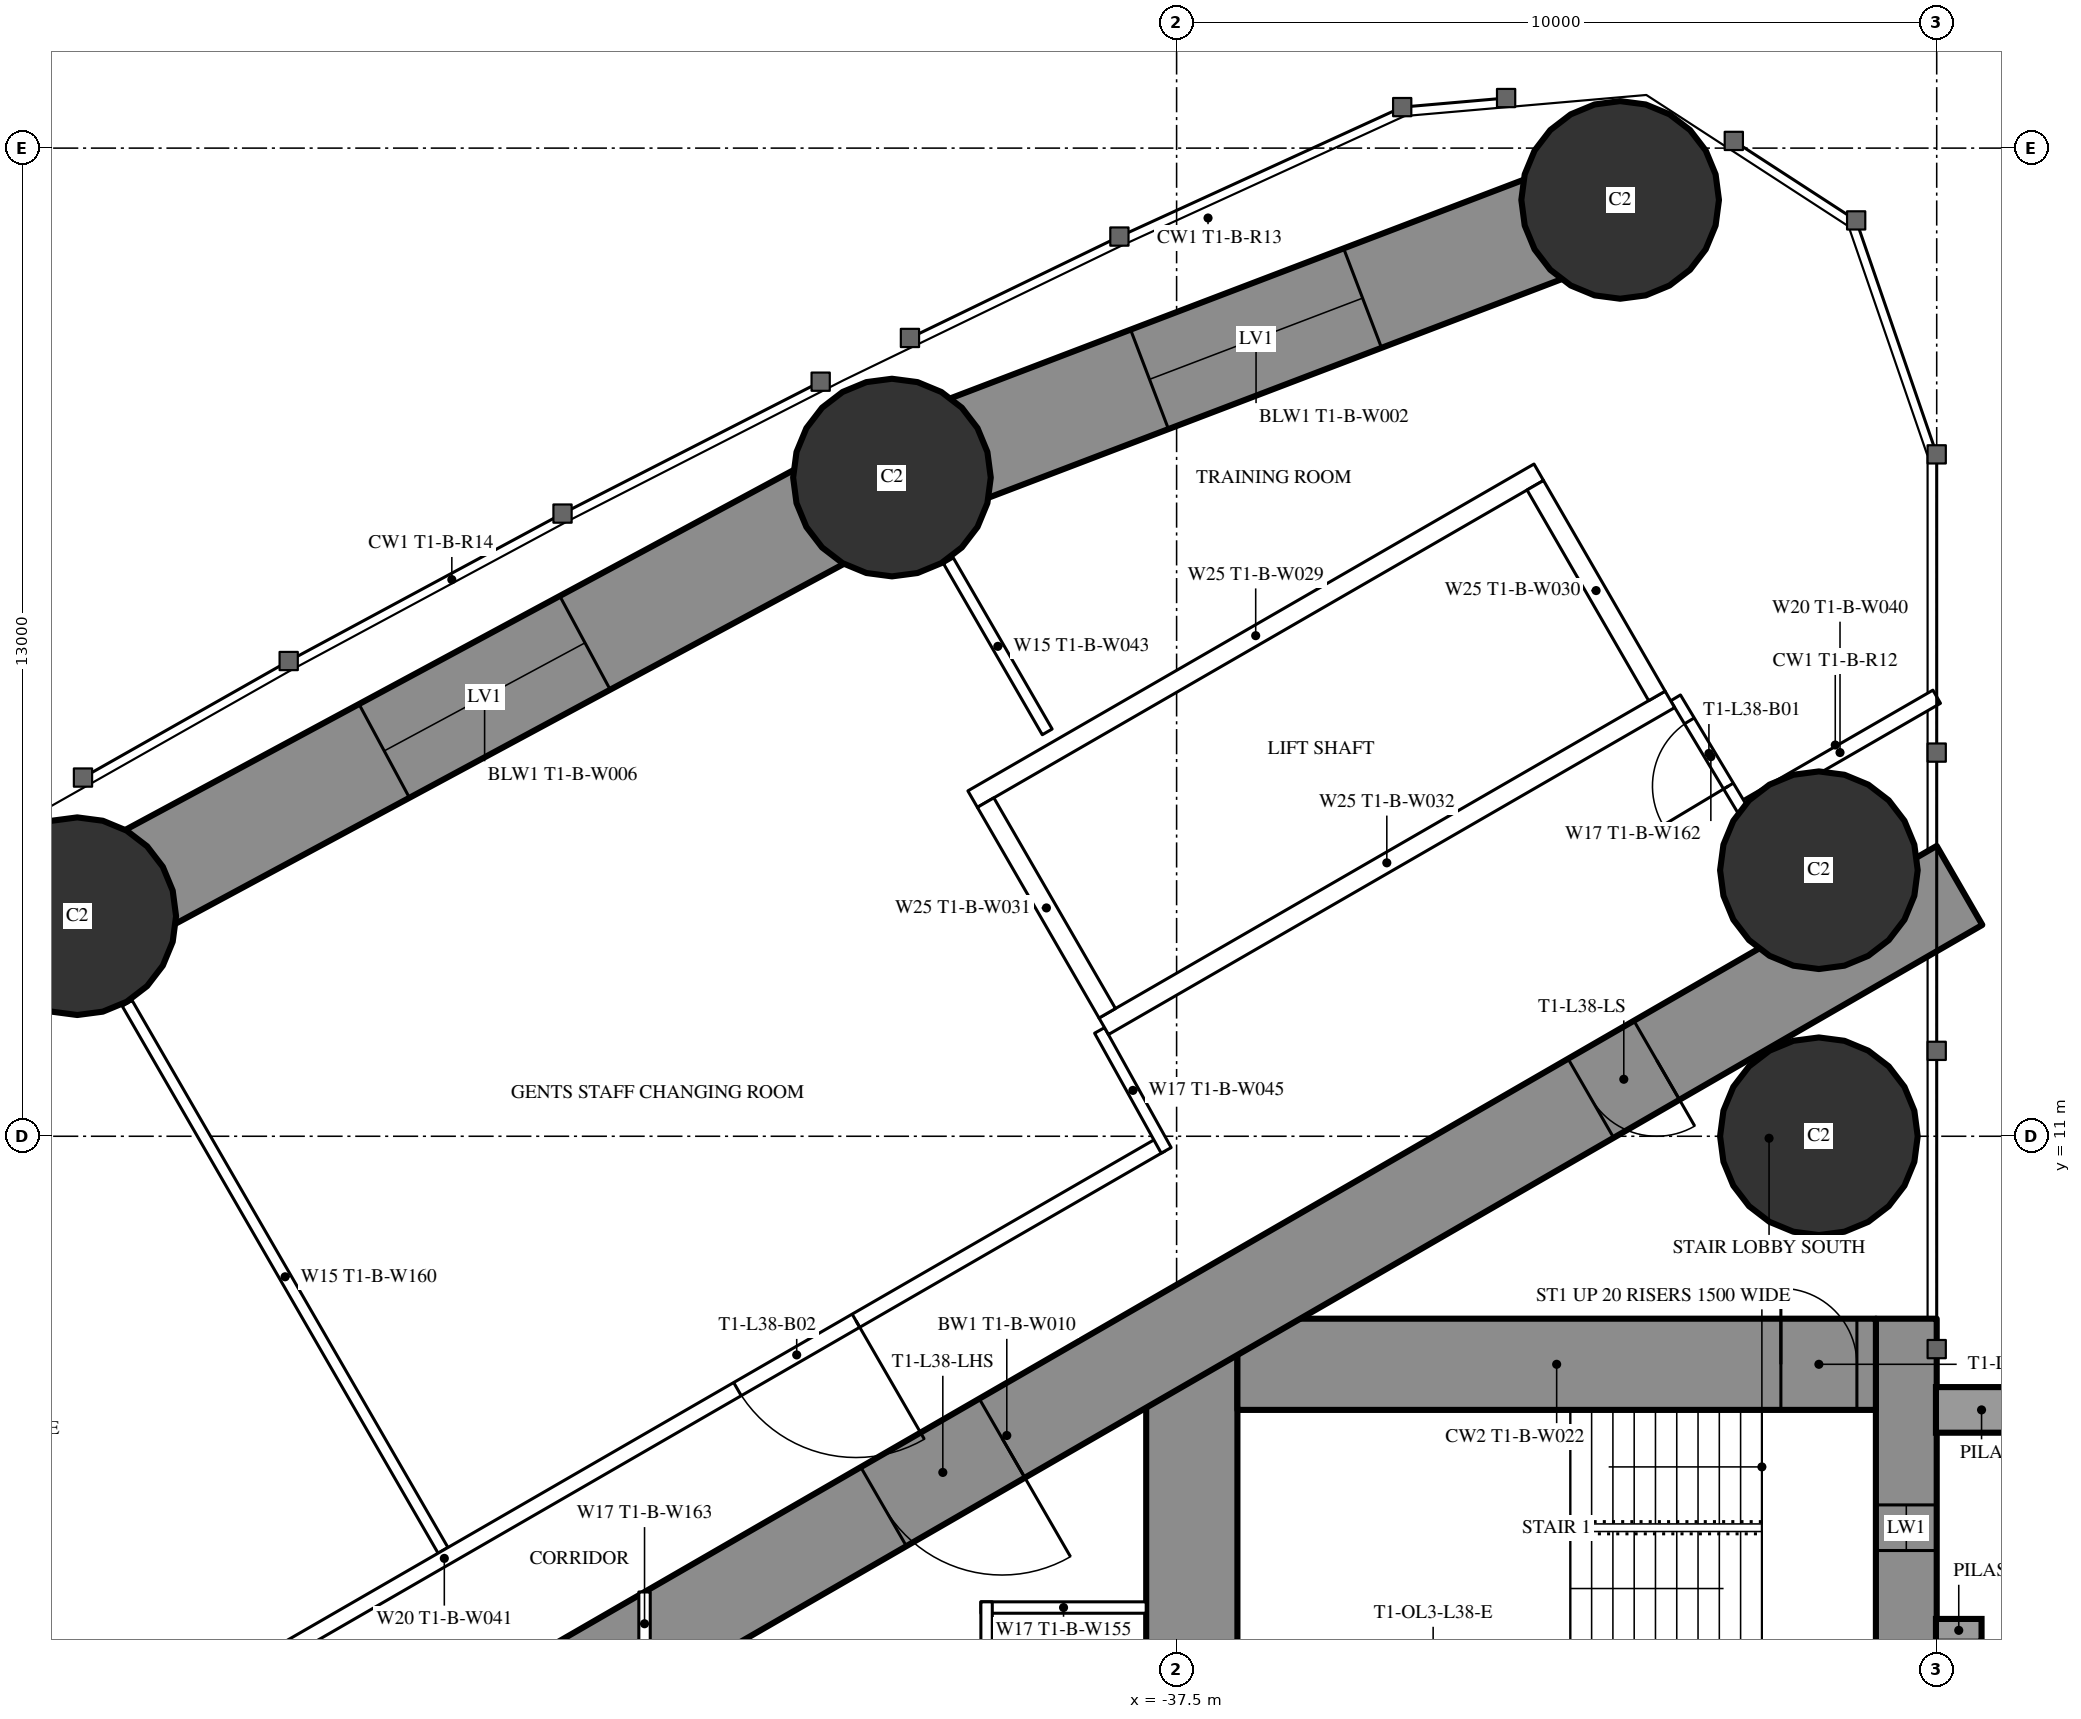
"""IFC4 building model, lengths in metres.
Left out: names, types, materials, properties, quantities, classifications, styles, units other than length and angle.
Written with IfcOpenShell. Run it as: python <this file> out.ifc"""

import sys

from ifc_helpers import new_model, si_unit, direction, frame, frame_2d, origin, origin_2d, place, context, subcontext, project, spatial, rectangle, hollow_circle, extrude, element, fill, save


model = new_model("IFC4")
c1 = context("Model", 3, precision=1e-05, world=origin(), true_north=direction((0.0, 1.0)))
c2 = subcontext(c1, "Body", "Model", "MODEL_VIEW")
j1 = project(units=[si_unit("LENGTHUNIT", "METRE"), si_unit("PLANEANGLEUNIT", "RADIAN")], contexts=[c1])
p1 = place(None, origin())
s1 = spatial("IfcSite", under=j1, at=p1, CompositionType="ELEMENT")
p2 = place(p1, origin())
s2 = spatial("IfcBuilding", under=s1, at=p2, CompositionType="ELEMENT")
p3 = place(p2, frame((0.0, 0.0, 143.1)))
s3 = spatial("IfcBuildingStorey", under=s2, at=p3, CompositionType="ELEMENT", Elevation=143.1)
for number, where, z_axis, x_axis in (
    (1, (-31.665, 23.318, 0.0), (0.0, 0.0, 1.0), (1.0, 0.0, 0.0)),
    (2, (-29.05, 11.0, 0.0), (0.0, 0.0, 1.0), (1.0, 0.0, 0.0)),
    (3, (-29.05, 14.5, 0.0), (0.0, 0.0, 1.0), (1.0, 0.0, 0.0)),
    (4, (-41.245, 19.666, 0.0), (0.0, 0.0, 1.0), (1.0, 0.0, 0.0)),
    (5, (-51.963, 13.895, 0.0), (0.0, 0.0, 1.0), (1.0, 0.0, 0.0)),
):
    element("IfcColumn", number, at=place(p3, frame(where, z_axis=z_axis, x_axis=x_axis)), inside=s3, PredefinedType="COLUMN", context=c2, shape_type="SweptSolid", body=[
        extrude(hollow_circle(Radius=1.3, WallThickness=0.1, at=origin_2d()), origin(), (0.0, 0.0, 1.0), 3.6),
    ])
p4 = place(p3, frame((-27.9, 8.6, 0.0), z_axis=(0.0, 0.0, 1.0), x_axis=(0.0, -1.0, 0.0)))
e6 = element("IfcWall", 6, at=p4, inside=s3, PredefinedType="SHEAR", context=c2, shape_type="SweptSolid", body=[
    extrude(rectangle(XDim=17.2, YDim=0.8, at=frame_2d((8.6, 0.0))), origin(), (0.0, 0.0, 1.0), 3.6),
])
p5 = place(p4, frame((2.45, 0.0, 0.6)))
e7 = element("IfcOpeningElement", 7, at=p5, cuts=e6, PredefinedType="OPENING", context=c2, shape_type="SweptSolid", body=[
    extrude(rectangle(XDim=0.6, YDim=2.1, at=frame_2d((0.3, 1.05))), frame((0.0, 0.41, 0.0), z_axis=(0.0, -1.0, 0.0), x_axis=(1.0, 0.0, 0.0)), (0.0, 0.0, 1.0), 0.82),
])
p6 = place(p4, frame((14.15, 0.0, 0.6)))
e8 = element("IfcOpeningElement", 8, at=p6, cuts=e6, PredefinedType="OPENING", context=c2, shape_type="SweptSolid", body=[
    extrude(rectangle(XDim=0.6, YDim=2.1, at=frame_2d((0.3, 1.05))), frame((0.0, 0.41, 0.0), z_axis=(0.0, -1.0, 0.0), x_axis=(1.0, 0.0, 0.0)), (0.0, 0.0, 1.0), 0.82),
])
p7 = place(p3, frame((-37.3, 8.6, 0.0), z_axis=(0.0, 0.0, 1.0), x_axis=(0.0, -1.0, 0.0)))
e9 = element("IfcWall", 9, at=p7, inside=s3, PredefinedType="SHEAR", context=c2, shape_type="SweptSolid", body=[
    extrude(rectangle(XDim=17.2, YDim=1.2, at=frame_2d((8.6, 0.0))), origin(), (0.0, 0.0, 1.0), 3.6),
])
p8 = place(p7, frame((7.7, 0.0, 0.0)))
e10 = element("IfcOpeningElement", 10, at=p8, cuts=e9, PredefinedType="OPENING", context=c2, shape_type="SweptSolid", body=[
    extrude(rectangle(XDim=1.8, YDim=2.2, at=frame_2d((0.9, 1.1))), frame((0.0, 0.61, 0.0), z_axis=(0.0, -1.0, 0.0), x_axis=(1.0, 0.0, 0.0)), (0.0, 0.0, 1.0), 1.22),
])
p9 = place(p3, frame((-28.3, 8.0, 0.0), z_axis=(0.0, 0.0, 1.0), x_axis=(-1.0, 0.0, 0.0)))
e11 = element("IfcWall", 11, at=p9, inside=s3, PredefinedType="SHEAR", context=c2, shape_type="SweptSolid", body=[
    extrude(rectangle(XDim=8.4, YDim=1.2, at=frame_2d((4.2, 0.0))), origin(), (0.0, 0.0, 1.0), 3.6),
])
p10 = place(p9, frame((0.25, 0.0, 0.0)))
e12 = element("IfcOpeningElement", 12, at=p10, cuts=e11, PredefinedType="OPENING", context=c2, shape_type="SweptSolid", body=[
    extrude(rectangle(XDim=1.0, YDim=2.2, at=frame_2d((0.5, 1.1))), frame((0.0, 0.61, 0.0), z_axis=(0.0, -1.0, 0.0), x_axis=(1.0, 0.0, 0.0)), (0.0, 0.0, 1.0), 1.22),
])
p11 = place(p3, frame((-27.2, 14.3, 0.0), z_axis=(0.0, 0.0, 1.0), x_axis=(-0.866026593062, -0.499997940104, 0.0)))
e13 = element("IfcWall", 13, at=p11, inside=s3, PredefinedType="SHEAR", context=c2, shape_type="SweptSolid", body=[
    extrude(rectangle(XDim=28.946, YDim=1.2, at=frame_2d((14.473, 0.0))), origin(), (0.0, 0.0, 1.0), 3.6),
])
p12 = place(p11, frame((4.6, 0.0, 0.0)))
e14 = element("IfcOpeningElement", 14, at=p12, cuts=e13, PredefinedType="OPENING", context=c2, shape_type="SweptSolid", body=[
    extrude(rectangle(XDim=1.0, YDim=2.2, at=frame_2d((0.5, 1.1))), frame((0.0, 0.61, 0.0), z_axis=(0.0, -1.0, 0.0), x_axis=(1.0, 0.0, 0.0)), (0.0, 0.0, 1.0), 1.22),
])
p13 = place(p11, frame((14.545, 0.0, 0.0)))
e15 = element("IfcOpeningElement", 15, at=p13, cuts=e13, PredefinedType="OPENING", context=c2, shape_type="SweptSolid", body=[
    extrude(rectangle(XDim=1.8, YDim=2.2, at=frame_2d((0.9, 1.1))), frame((0.0, 0.61, 0.0), z_axis=(0.0, -1.0, 0.0), x_axis=(1.0, 0.0, 0.0)), (0.0, 0.0, 1.0), 1.22),
])
p14 = place(p3, frame((-31.665, 23.318, 0.0), z_axis=(0.0, 0.0, 1.0), x_axis=(-0.934392266213, -0.356245832033, 0.0)))
e16 = element("IfcWall", 16, at=p14, inside=s3, PredefinedType="SHEAR", context=c2, shape_type="SweptSolid", body=[
    extrude(rectangle(XDim=10.253, YDim=1.4, at=frame_2d((5.126, 0.0))), origin(), (0.0, 0.0, 1.0), 3.6),
])
p15 = place(p14, frame((3.626, 0.0, 0.6)))
e17 = element("IfcOpeningElement", 17, at=p15, cuts=e16, PredefinedType="OPENING", context=c2, shape_type="SweptSolid", body=[
    extrude(rectangle(XDim=3.0, YDim=1.2, at=frame_2d((1.5, 0.6))), frame((0.0, 0.71, 0.0), z_axis=(0.0, -1.0, 0.0), x_axis=(1.0, 0.0, 0.0)), (0.0, 0.0, 1.0), 1.42),
])
p16 = place(p3, frame((-41.245, 19.666, 0.0), z_axis=(0.0, 0.0, 1.0), x_axis=(-0.880492350889, -0.474060354835, 0.0)))
e18 = element("IfcWall", 18, at=p16, inside=s3, PredefinedType="SHEAR", context=c2, shape_type="SweptSolid", body=[
    extrude(rectangle(XDim=12.173, YDim=1.4, at=frame_2d((6.086, 0.0))), origin(), (0.0, 0.0, 1.0), 3.6),
])
p17 = place(p16, frame((4.586, 0.0, 0.6)))
e19 = element("IfcOpeningElement", 19, at=p17, cuts=e18, PredefinedType="OPENING", context=c2, shape_type="SweptSolid", body=[
    extrude(rectangle(XDim=3.0, YDim=1.2, at=frame_2d((1.5, 0.6))), frame((0.0, 0.71, 0.0), z_axis=(0.0, -1.0, 0.0), x_axis=(1.0, 0.0, 0.0)), (0.0, 0.0, 1.0), 1.42),
])
p18 = place(p3, frame((-51.963, 13.895, 0.0), z_axis=(0.0, 0.0, 1.0), x_axis=(-0.848062521637, -0.529896177939, 0.0)))
e20 = element("IfcWall", 20, at=p18, inside=s3, PredefinedType="SHEAR", context=c2, shape_type="SweptSolid", body=[
    extrude(rectangle(XDim=12.173, YDim=1.4, at=frame_2d((6.086, 0.0))), origin(), (0.0, 0.0, 1.0), 3.6),
])
p19 = place(p18, frame((4.586, 0.0, 0.6)))
e21 = element("IfcOpeningElement", 21, at=p19, cuts=e20, PredefinedType="OPENING", context=c2, shape_type="SweptSolid", body=[
    extrude(rectangle(XDim=3.0, YDim=1.2, at=frame_2d((1.5, 0.6))), frame((0.0, 0.71, 0.0), z_axis=(0.0, -1.0, 0.0), x_axis=(1.0, 0.0, 0.0)), (0.0, 0.0, 1.0), 1.42),
])
p20 = place(p3, frame((-47.151, 5.552, 0.0), z_axis=(0.0, 0.0, 1.0), x_axis=(-0.500003012045, 0.866023664773, 0.0)))
e22 = element("IfcWall", 22, at=p20, inside=s3, PredefinedType="PARTITIONING", context=c2, shape_type="SweptSolid", body=[
    extrude(rectangle(XDim=8.311, YDim=0.15, at=frame_2d((4.156, 0.0))), origin(), (0.0, 0.0, 1.0), 2.15),
])
p21 = place(p3, frame((-39.202, 16.32, 0.0), z_axis=(0.0, 0.0, 1.0), x_axis=(-0.499947391036, 0.866055775454, 0.0)))
e23 = element("IfcWall", 23, at=p21, inside=s3, PredefinedType="PARTITIONING", context=c2, shape_type="SweptSolid", body=[
    extrude(rectangle(XDim=2.599, YDim=0.15, at=frame_2d((1.3, 0.0))), origin(), (0.0, 0.0, 1.0), 3.35),
])
p22 = place(p3, frame((-27.5, 16.782, 0.0), z_axis=(0.0, 0.0, 1.0), x_axis=(-0.866045812642, -0.499964649156, 0.0)))
e24 = element("IfcWall", 24, at=p22, inside=s3, PredefinedType="PARTITIONING", context=c2, shape_type="SweptSolid", body=[
    extrude(rectangle(XDim=2.938, YDim=0.2, at=frame_2d((1.469, 0.0))), origin(), (0.0, 0.0, 1.0), 3.35),
])
p23 = place(p3, frame((-37.7, 10.894, 0.0), z_axis=(0.0, 0.0, 1.0), x_axis=(-0.866027905338, -0.499995667157, 0.0)))
e25 = element("IfcWall", 25, at=p23, inside=s3, PredefinedType="PARTITIONING", context=c2, shape_type="SweptSolid", body=[
    extrude(rectangle(XDim=21.787, YDim=0.2, at=frame_2d((10.894, 0.0))), origin(), (0.0, 0.0, 1.0), 3.35),
])
p24 = place(p23, frame((14.296, 0.0, 0.0)))
e26 = element("IfcOpeningElement", 26, at=p24, cuts=e25, PredefinedType="OPENING", context=c2, shape_type="SweptSolid", body=[
    extrude(rectangle(XDim=1.8, YDim=2.2, at=frame_2d((0.9, 1.1))), frame((0.0, 0.11, 0.0), z_axis=(0.0, -1.0, 0.0), x_axis=(1.0, 0.0, 0.0)), (0.0, 0.0, 1.0), 0.22),
])
p25 = place(p23, frame((19.399, 0.0, 0.0)))
e27 = element("IfcOpeningElement", 27, at=p25, cuts=e25, PredefinedType="OPENING", context=c2, shape_type="SweptSolid", body=[
    extrude(rectangle(XDim=1.8, YDim=2.14, at=frame_2d((0.9, 1.07))), frame((0.0, 0.11, 0.0), z_axis=(0.0, -1.0, 0.0), x_axis=(1.0, 0.0, 0.0)), (0.0, 0.0, 1.0), 0.22),
])
p26 = place(p23, frame((4.64, 0.0, 0.0)))
e28 = element("IfcOpeningElement", 28, at=p26, cuts=e25, PredefinedType="OPENING", context=c2, shape_type="SweptSolid", body=[
    extrude(rectangle(XDim=1.8, YDim=2.2, at=frame_2d((0.9, 1.1))), frame((0.0, 0.11, 0.0), z_axis=(0.0, -1.0, 0.0), x_axis=(1.0, 0.0, 0.0)), (0.0, 0.0, 1.0), 0.22),
])
p27 = place(p3, frame((-30.007, 15.219, 0.0), z_axis=(0.0, 0.0, 1.0), x_axis=(-0.514296815006, 0.857612258585, 0.0)))
e29 = element("IfcWall", 29, at=p27, inside=s3, PredefinedType="PARTITIONING", context=c2, shape_type="SweptSolid", body=[
    extrude(rectangle(XDim=1.805, YDim=0.15, at=frame_2d((0.902, 0.0))), origin(), (0.0, 0.0, 1.0), 2.05),
])
p28 = place(p27, frame((0.452, 0.0, 0.0)))
e30 = element("IfcOpeningElement", 30, at=p28, cuts=e29, PredefinedType="OPENING", context=c2, shape_type="SweptSolid", body=[
    extrude(rectangle(XDim=1.0, YDim=2.04, at=frame_2d((0.5, 1.02))), frame((0.0, 0.085, 0.0), z_axis=(0.0, -1.0, 0.0), x_axis=(1.0, 0.0, 0.0)), (0.0, 0.0, 1.0), 0.17),
])
p29 = place(p3, frame((-38.513, 12.392, 0.0), z_axis=(0.0, 0.0, 1.0), x_axis=(0.485585508183, -0.874189175317, 0.0)))
e31 = element("IfcWall", 31, at=p29, inside=s3, PredefinedType="PARTITIONING", context=c2, shape_type="SweptSolid", body=[
    extrude(rectangle(XDim=1.805, YDim=0.15, at=frame_2d((0.902, 0.0))), origin(), (0.0, 0.0, 1.0), 3.35),
])
p30 = place(p3, frame((-37.9, 4.8, 0.0), z_axis=(0.0, 0.0, 1.0), x_axis=(-1.0, 0.0, 0.0)))
e32 = element("IfcWall", 32, at=p30, inside=s3, PredefinedType="PARTITIONING", context=c2, shape_type="SweptSolid", body=[
    extrude(rectangle(XDim=2.175, YDim=0.15, at=frame_2d((1.087, 0.0))), origin(), (0.0, 0.0, 1.0), 3.35),
])
p31 = place(p3, frame((-40.0, 4.875, 0.0), z_axis=(0.0, 0.0, 1.0), x_axis=(0.0, -1.0, 0.0)))
e33 = element("IfcWall", 33, at=p31, inside=s3, PredefinedType="PARTITIONING", context=c2, shape_type="SweptSolid", body=[
    extrude(rectangle(XDim=3.75, YDim=0.15, at=frame_2d((1.875, 0.0))), origin(), (0.0, 0.0, 1.0), 3.35),
])
p32 = place(p31, frame((1.375, 0.0, 0.0)))
e34 = element("IfcOpeningElement", 34, at=p32, cuts=e33, PredefinedType="OPENING", context=c2, shape_type="SweptSolid", body=[
    extrude(rectangle(XDim=1.0, YDim=2.2, at=frame_2d((0.5, 1.1))), frame((0.0, 0.085, 0.0), z_axis=(0.0, -1.0, 0.0), x_axis=(1.0, 0.0, 0.0)), (0.0, 0.0, 1.0), 0.17),
])
for number, where, z_axis, x_axis in (
    (35, (-31.01, 16.747, 0.0), (0.0, 0.0, 1.0), (-0.866, -0.5, 0.0)),
    (36, (-32.736, 19.736, 0.0), (0.0, 0.0, 1.0), (-0.866, -0.5, 0.0)),
):
    element("IfcWall", number, at=place(p3, frame(where, z_axis=z_axis, x_axis=x_axis)), inside=s3, PredefinedType="PARTITIONING", context=c2, shape_type="SweptSolid", body=[
        extrude(rectangle(XDim=8.6, YDim=0.25, at=frame_2d((4.3, 0.0))), origin(), (0.0, 0.0, 1.0), 3.35),
    ])
p33 = place(p3, frame((-31.181, 16.793, 0.0), z_axis=(0.0, 0.0, 1.0), x_axis=(-0.499929347863, 0.866066190972, 0.0)))
e37 = element("IfcWall", 37, at=p33, inside=s3, PredefinedType="PARTITIONING", context=c2, shape_type="SweptSolid", body=[
    extrude(rectangle(XDim=3.201, YDim=0.25, at=frame_2d((1.6, 0.0))), origin(), (0.0, 0.0, 1.0), 3.35),
])
p34 = place(p3, frame((-38.413, 12.618, 0.0), z_axis=(0.0, 0.0, 1.0), x_axis=(-0.499872130319, 0.866099216793, 0.0)))
e38 = element("IfcWall", 38, at=p34, inside=s3, PredefinedType="PARTITIONING", context=c2, shape_type="SweptSolid", body=[
    extrude(rectangle(XDim=3.2, YDim=0.25, at=frame_2d((1.6, 0.0))), origin(), (0.0, 0.0, 1.0), 3.35),
])
p35 = place(p3, frame((-44.5, 5.005, 0.0), z_axis=(0.0, 0.0, 1.0), x_axis=(0.0, -1.0, 0.0)))
e39 = element("IfcWall", 39, at=p35, inside=s3, PredefinedType="PARTITIONING", context=c2, shape_type="SweptSolid", body=[
    extrude(rectangle(XDim=0.836, YDim=0.15, at=frame_2d((0.418, 0.0))), origin(), (0.0, 0.0, 1.0), 2.15),
])
p36 = place(p15, origin())
e40 = element("IfcWindow", 40, at=p36, inside=s3, PartitioningType="SINGLE_PANEL", PredefinedType="WINDOW", context=c2, shape_type="SweptSolid", body=[
    extrude(rectangle(XDim=3.0, YDim=1.2, at=frame_2d((1.5, 0.6))), frame((0.0, 0.03, 0.0), z_axis=(0.0, -1.0, 0.0), x_axis=(1.0, 0.0, 0.0)), (0.0, 0.0, 1.0), 0.06),
])
fill(e17, e40)
p37 = place(p17, origin())
e41 = element("IfcWindow", 41, at=p37, inside=s3, PartitioningType="SINGLE_PANEL", PredefinedType="WINDOW", context=c2, shape_type="SweptSolid", body=[
    extrude(rectangle(XDim=3.0, YDim=1.2, at=frame_2d((1.5, 0.6))), frame((0.0, 0.03, 0.0), z_axis=(0.0, -1.0, 0.0), x_axis=(1.0, 0.0, 0.0)), (0.0, 0.0, 1.0), 0.06),
])
fill(e19, e41)
p38 = place(p28, origin())
e42 = element("IfcDoor", 42, at=p38, inside=s3, OperationType="SINGLE_SWING_LEFT", PredefinedType="DOOR", context=c2, shape_type="SweptSolid", body=[
    extrude(rectangle(XDim=1.0, YDim=2.04, at=frame_2d((0.5, 1.02))), frame((0.0, 0.025, 0.0), z_axis=(0.0, -1.0, 0.0), x_axis=(1.0, 0.0, 0.0)), (0.0, 0.0, 1.0), 0.05),
])
fill(e30, e42)
p39 = place(p26, origin())
e43 = element("IfcDoor", 43, at=p39, inside=s3, OperationType="DOUBLE_DOOR_SINGLE_SWING", PredefinedType="DOOR", context=c2, shape_type="SweptSolid", body=[
    extrude(rectangle(XDim=1.8, YDim=2.2, at=frame_2d((0.9, 1.1))), frame((0.0, 0.025, 0.0), z_axis=(0.0, -1.0, 0.0), x_axis=(1.0, 0.0, 0.0)), (0.0, 0.0, 1.0), 0.05),
])
fill(e28, e43)
p40 = place(p12, origin())
e44 = element("IfcDoor", 44, at=p40, inside=s3, OperationType="SINGLE_SWING_LEFT", PredefinedType="DOOR", context=c2, shape_type="SweptSolid", body=[
    extrude(rectangle(XDim=1.0, YDim=2.2, at=frame_2d((0.5, 1.1))), frame((0.0, 0.025, 0.0), z_axis=(0.0, -1.0, 0.0), x_axis=(1.0, 0.0, 0.0)), (0.0, 0.0, 1.0), 0.05),
])
fill(e14, e44)
p41 = place(p13, origin())
e45 = element("IfcDoor", 45, at=p41, inside=s3, OperationType="DOUBLE_DOOR_SINGLE_SWING", PredefinedType="DOOR", context=c2, shape_type="SweptSolid", body=[
    extrude(rectangle(XDim=1.8, YDim=2.2, at=frame_2d((0.9, 1.1))), frame((0.0, 0.025, 0.0), z_axis=(0.0, -1.0, 0.0), x_axis=(1.0, 0.0, 0.0)), (0.0, 0.0, 1.0), 0.05),
])
fill(e15, e45)
p42 = place(p10, origin())
e46 = element("IfcDoor", 46, at=p42, inside=s3, OperationType="SINGLE_SWING_RIGHT", PredefinedType="DOOR", context=c2, shape_type="SweptSolid", body=[
    extrude(rectangle(XDim=1.0, YDim=2.2, at=frame_2d((0.5, 1.1))), frame((0.0, 0.025, 0.0), z_axis=(0.0, -1.0, 0.0), x_axis=(1.0, 0.0, 0.0)), (0.0, 0.0, 1.0), 0.05),
])
fill(e12, e46)
p43 = place(p5, origin())
e47 = element("IfcWindow", 47, at=p43, inside=s3, PartitioningType="SINGLE_PANEL", PredefinedType="WINDOW", context=c2, shape_type="SweptSolid", body=[
    extrude(rectangle(XDim=0.6, YDim=2.1, at=frame_2d((0.3, 1.05))), frame((0.0, 0.03, 0.0), z_axis=(0.0, -1.0, 0.0), x_axis=(1.0, 0.0, 0.0)), (0.0, 0.0, 1.0), 0.06),
])
fill(e7, e47)
save(model, sys.argv[1])
